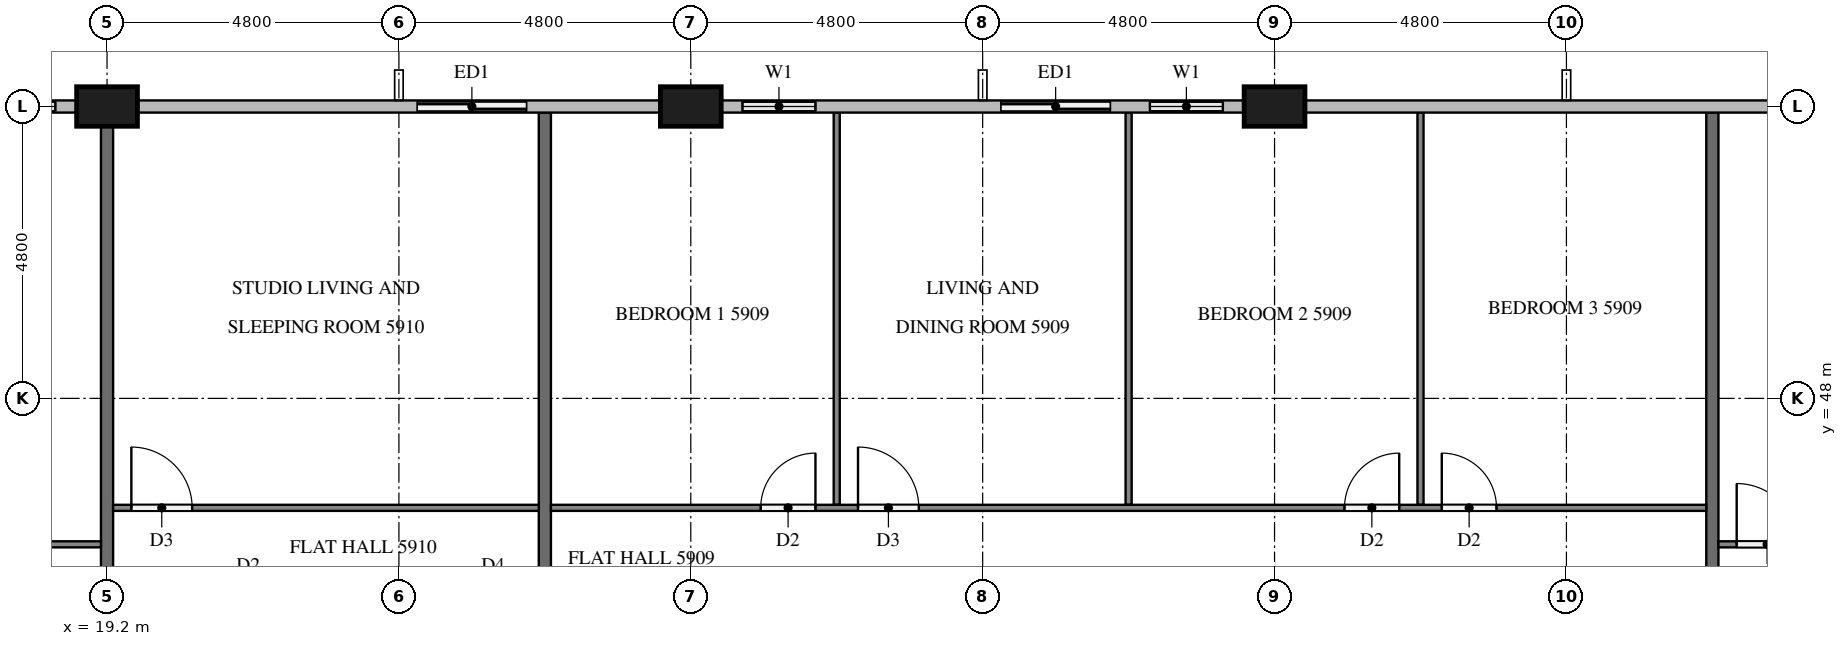
"""IFC4 building model, lengths in metres.
Left out: names, types, materials, properties, quantities, classifications, styles, units other than length and angle.
Written with IfcOpenShell. Run it as: python <this file> out.ifc"""

import sys

from ifc_helpers import new_model, si_unit, direction, frame, frame_2d, origin, origin_2d, place, context, subcontext, project, spatial, rectangle, extrude, element, fill, save


model = new_model("IFC4")
c1 = context("Model", 3, precision=1e-05, world=origin(), true_north=direction((0.0, 1.0)))
c2 = subcontext(c1, "Body", "Model", "MODEL_VIEW")
j1 = project(units=[si_unit("LENGTHUNIT", "METRE"), si_unit("PLANEANGLEUNIT", "RADIAN")], contexts=[c1])
p1 = place(None, origin())
s1 = spatial("IfcSite", under=j1, at=p1, CompositionType="ELEMENT")
p2 = place(p1, origin())
s2 = spatial("IfcBuilding", under=s1, at=p2, CompositionType="ELEMENT")
p3 = place(p2, frame((0.0, 0.0, 226.3)))
s3 = spatial("IfcBuildingStorey", under=s2, at=p3, CompositionType="ELEMENT", Elevation=226.3)
for number, where, z_axis, x_axis in (
    (1, (38.4, 52.8, 0.0), (0.0, 0.0, 1.0), (1.0, 0.0, 0.0)),
    (2, (28.8, 52.8, 0.0), (0.0, 0.0, 1.0), (1.0, 0.0, 0.0)),
    (3, (19.2, 52.8, 0.0), (0.0, 0.0, 1.0), (1.0, 0.0, 0.0)),
):
    element("IfcColumn", number, at=place(p3, frame(where, z_axis=z_axis, x_axis=x_axis)), inside=s3, PredefinedType="COLUMN", context=c2, shape_type="SweptSolid", body=[
        extrude(rectangle(XDim=1.0, YDim=0.65, at=origin_2d()), origin(), (0.0, 0.0, 1.0), 3.2),
    ])
p4 = place(p3, frame((37.9, 52.8, 0.0), z_axis=(0.0, 0.0, 1.0), x_axis=(-1.0, 0.0, 0.0)))
e4 = element("IfcWall", 4, at=p4, inside=s3, PredefinedType="SOLIDWALL", context=c2, shape_type="SweptSolid", body=[
    extrude(rectangle(XDim=4.3, YDim=0.15, at=frame_2d((2.15, 0.0))), origin(), (0.0, 0.0, 1.0), 3.2),
])
p5 = place(p4, frame((0.35, 0.0, 0.9)))
e5 = element("IfcOpeningElement", 5, at=p5, cuts=e4, PredefinedType="OPENING", context=c2, shape_type="SweptSolid", body=[
    extrude(rectangle(XDim=1.2, YDim=1.4, at=frame_2d((0.6, 0.7))), frame((0.0, 0.085, 0.0), z_axis=(0.0, -1.0, 0.0), x_axis=(1.0, 0.0, 0.0)), (0.0, 0.0, 1.0), 0.17),
])
p6 = place(p4, frame((2.2, 0.0, 0.0)))
e6 = element("IfcOpeningElement", 6, at=p6, cuts=e4, PredefinedType="OPENING", context=c2, shape_type="SweptSolid", body=[
    extrude(rectangle(XDim=1.8, YDim=2.4, at=frame_2d((0.9, 1.2))), frame((0.0, 0.085, 0.0), z_axis=(0.0, -1.0, 0.0), x_axis=(1.0, 0.0, 0.0)), (0.0, 0.0, 1.0), 0.17),
])
p7 = place(p3, frame((31.2, 52.8, 0.0), z_axis=(0.0, 0.0, 1.0), x_axis=(-1.0, 0.0, 0.0)))
e7 = element("IfcWall", 7, at=p7, inside=s3, PredefinedType="SOLIDWALL", context=c2, shape_type="SweptSolid", body=[
    extrude(rectangle(XDim=1.9, YDim=0.15, at=frame_2d((0.95, 0.0))), origin(), (0.0, 0.0, 1.0), 3.2),
])
p8 = place(p7, frame((0.35, 0.0, 0.9)))
e8 = element("IfcOpeningElement", 8, at=p8, cuts=e7, PredefinedType="OPENING", context=c2, shape_type="SweptSolid", body=[
    extrude(rectangle(XDim=1.2, YDim=1.4, at=frame_2d((0.6, 0.7))), frame((0.0, 0.085, 0.0), z_axis=(0.0, -1.0, 0.0), x_axis=(1.0, 0.0, 0.0)), (0.0, 0.0, 1.0), 0.17),
])
p9 = place(p3, frame((26.4, 52.8, 0.0), z_axis=(0.0, 0.0, 1.0), x_axis=(-1.0, 0.0, 0.0)))
e9 = element("IfcWall", 9, at=p9, inside=s3, PredefinedType="SOLIDWALL", context=c2, shape_type="SweptSolid", body=[
    extrude(rectangle(XDim=2.4, YDim=0.15, at=frame_2d((1.2, 0.0))), origin(), (0.0, 0.0, 1.0), 3.2),
])
p10 = place(p9, frame((0.3, 0.0, 0.0)))
e10 = element("IfcOpeningElement", 10, at=p10, cuts=e9, PredefinedType="OPENING", context=c2, shape_type="SweptSolid", body=[
    extrude(rectangle(XDim=1.8, YDim=2.4, at=frame_2d((0.9, 1.2))), frame((0.0, 0.085, 0.0), z_axis=(0.0, -1.0, 0.0), x_axis=(1.0, 0.0, 0.0)), (0.0, 0.0, 1.0), 0.17),
])
p11 = place(p3, frame((18.7, 52.8, 0.0), z_axis=(0.0, 0.0, 1.0), x_axis=(-1.0, 0.0, 0.0)))
e11 = element("IfcWall", 11, at=p11, inside=s3, PredefinedType="SOLIDWALL", context=c2, shape_type="SweptSolid", body=[
    extrude(rectangle(XDim=1.9, YDim=0.15, at=frame_2d((0.95, 0.0))), origin(), (0.0, 0.0, 1.0), 3.2),
])
p12 = place(p11, frame((0.35, 0.0, 0.9)))
e12 = element("IfcOpeningElement", 12, at=p12, cuts=e11, PredefinedType="OPENING", context=c2, shape_type="SweptSolid", body=[
    extrude(rectangle(XDim=1.2, YDim=1.4, at=frame_2d((0.6, 0.7))), frame((0.0, 0.085, 0.0), z_axis=(0.0, -1.0, 0.0), x_axis=(1.0, 0.0, 0.0)), (0.0, 0.0, 1.0), 0.17),
])
for number, where, z_axis, x_axis in (
    (13, (45.6, 52.7, 0.0), (0.0, 0.0, 1.0), (0.0, -1.0, 0.0)),
    (14, (26.4, 52.7, 0.0), (0.0, 0.0, 1.0), (0.0, -1.0, 0.0)),
):
    element("IfcWall", number, at=place(p3, frame(where, z_axis=z_axis, x_axis=x_axis)), inside=s3, PredefinedType="PARTITIONING", context=c2, shape_type="SweptSolid", body=[
        extrude(rectangle(XDim=11.8, YDim=0.2, at=frame_2d((5.9, 0.0))), origin(), (0.0, 0.0, 1.0), 3.2),
    ])
p13 = place(p3, frame((19.2, 52.475, 0.0), z_axis=(0.0, 0.0, 1.0), x_axis=(0.0, -1.0, 0.0)))
e15 = element("IfcWall", 15, at=p13, inside=s3, PredefinedType="PARTITIONING", context=c2, shape_type="SweptSolid", body=[
    extrude(rectangle(XDim=11.575, YDim=0.2, at=frame_2d((5.788, 0.0))), origin(), (0.0, 0.0, 1.0), 3.2),
])
p14 = place(p3, frame((45.7, 45.6, 0.0), z_axis=(0.0, 0.0, 1.0), x_axis=(1.0, 0.0, 0.0)))
e16 = element("IfcWall", 16, at=p14, inside=s3, PredefinedType="PARTITIONING", context=c2, shape_type="SweptSolid", body=[
    extrude(rectangle(XDim=16.6, YDim=0.1, at=frame_2d((8.3, 0.0))), origin(), (0.0, 0.0, 1.0), 3.2),
])
p15 = place(p14, frame((0.3, 0.0, 0.0)))
e17 = element("IfcOpeningElement", 17, at=p15, cuts=e16, PredefinedType="OPENING", context=c2, shape_type="SweptSolid", body=[
    extrude(rectangle(XDim=1.0, YDim=2.1, at=frame_2d((0.5, 1.05))), frame((0.0, 0.06, 0.0), z_axis=(0.0, -1.0, 0.0), x_axis=(1.0, 0.0, 0.0)), (0.0, 0.0, 1.0), 0.12),
])
p16 = place(p14, frame((10.65, 0.0, 0.0)))
e18 = element("IfcOpeningElement", 18, at=p16, cuts=e16, PredefinedType="OPENING", context=c2, shape_type="SweptSolid", body=[
    extrude(rectangle(XDim=0.9, YDim=2.1, at=frame_2d((0.45, 1.05))), frame((0.0, 0.06, 0.0), z_axis=(0.0, -1.0, 0.0), x_axis=(1.0, 0.0, 0.0)), (0.0, 0.0, 1.0), 0.12),
])
p17 = place(p14, frame((12.25, 0.0, 0.0)))
e19 = element("IfcOpeningElement", 19, at=p17, cuts=e16, PredefinedType="OPENING", context=c2, shape_type="SweptSolid", body=[
    extrude(rectangle(XDim=0.9, YDim=2.1, at=frame_2d((0.45, 1.05))), frame((0.0, 0.06, 0.0), z_axis=(0.0, -1.0, 0.0), x_axis=(1.0, 0.0, 0.0)), (0.0, 0.0, 1.0), 0.12),
])
for number, where, z_axis, x_axis in (
    (20, (31.2, 46.25, 0.0), (0.0, 0.0, 1.0), (0.0, 1.0, 0.0)),
    (21, (36.0, 46.25, 0.0), (0.0, 0.0, 1.0), (0.0, 1.0, 0.0)),
    (22, (40.8, 46.25, 0.0), (0.0, 0.0, 1.0), (0.0, 1.0, 0.0)),
):
    element("IfcWall", number, at=place(p3, frame(where, z_axis=z_axis, x_axis=x_axis)), inside=s3, PredefinedType="PARTITIONING", context=c2, shape_type="SweptSolid", body=[
        extrude(rectangle(XDim=6.45, YDim=0.1, at=frame_2d((3.225, 0.0))), origin(), (0.0, 0.0, 1.0), 3.2),
    ])
p18 = place(p3, frame((26.5, 46.2, 0.0), z_axis=(0.0, 0.0, 1.0), x_axis=(1.0, 0.0, 0.0)))
e23 = element("IfcWall", 23, at=p18, inside=s3, PredefinedType="PARTITIONING", context=c2, shape_type="SweptSolid", body=[
    extrude(rectangle(XDim=19.0, YDim=0.1, at=frame_2d((9.5, 0.0))), origin(), (0.0, 0.0, 1.0), 3.2),
])
p19 = place(p18, frame((3.45, 0.0, 0.0)))
e24 = element("IfcOpeningElement", 24, at=p19, cuts=e23, PredefinedType="OPENING", context=c2, shape_type="SweptSolid", body=[
    extrude(rectangle(XDim=0.9, YDim=2.1, at=frame_2d((0.45, 1.05))), frame((0.0, 0.06, 0.0), z_axis=(0.0, -1.0, 0.0), x_axis=(1.0, 0.0, 0.0)), (0.0, 0.0, 1.0), 0.12),
])
p20 = place(p18, frame((5.05, 0.0, 0.0)))
e25 = element("IfcOpeningElement", 25, at=p20, cuts=e23, PredefinedType="OPENING", context=c2, shape_type="SweptSolid", body=[
    extrude(rectangle(XDim=1.0, YDim=2.1, at=frame_2d((0.5, 1.05))), frame((0.0, 0.06, 0.0), z_axis=(0.0, -1.0, 0.0), x_axis=(1.0, 0.0, 0.0)), (0.0, 0.0, 1.0), 0.12),
])
p21 = place(p18, frame((13.05, 0.0, 0.0)))
e26 = element("IfcOpeningElement", 26, at=p21, cuts=e23, PredefinedType="OPENING", context=c2, shape_type="SweptSolid", body=[
    extrude(rectangle(XDim=0.9, YDim=2.1, at=frame_2d((0.45, 1.05))), frame((0.0, 0.06, 0.0), z_axis=(0.0, -1.0, 0.0), x_axis=(1.0, 0.0, 0.0)), (0.0, 0.0, 1.0), 0.12),
])
p22 = place(p18, frame((14.65, 0.0, 0.0)))
e27 = element("IfcOpeningElement", 27, at=p22, cuts=e23, PredefinedType="OPENING", context=c2, shape_type="SweptSolid", body=[
    extrude(rectangle(XDim=0.9, YDim=2.1, at=frame_2d((0.45, 1.05))), frame((0.0, 0.06, 0.0), z_axis=(0.0, -1.0, 0.0), x_axis=(1.0, 0.0, 0.0)), (0.0, 0.0, 1.0), 0.12),
])
p23 = place(p3, frame((19.3, 46.2, 0.0), z_axis=(0.0, 0.0, 1.0), x_axis=(1.0, 0.0, 0.0)))
e28 = element("IfcWall", 28, at=p23, inside=s3, PredefinedType="PARTITIONING", context=c2, shape_type="SweptSolid", body=[
    extrude(rectangle(XDim=7.0, YDim=0.1, at=frame_2d((3.5, 0.0))), origin(), (0.0, 0.0, 1.0), 3.2),
])
p24 = place(p23, frame((0.3, 0.0, 0.0)))
e29 = element("IfcOpeningElement", 29, at=p24, cuts=e28, PredefinedType="OPENING", context=c2, shape_type="SweptSolid", body=[
    extrude(rectangle(XDim=1.0, YDim=2.1, at=frame_2d((0.5, 1.05))), frame((0.0, 0.06, 0.0), z_axis=(0.0, -1.0, 0.0), x_axis=(1.0, 0.0, 0.0)), (0.0, 0.0, 1.0), 0.12),
])
p25 = place(p3, frame((4.9, 45.6, 0.0), z_axis=(0.0, 0.0, 1.0), x_axis=(1.0, 0.0, 0.0)))
e30 = element("IfcWall", 30, at=p25, inside=s3, PredefinedType="PARTITIONING", context=c2, shape_type="SweptSolid", body=[
    extrude(rectangle(XDim=14.2, YDim=0.1, at=frame_2d((7.1, 0.0))), origin(), (0.0, 0.0, 1.0), 3.2),
])
p26 = place(p25, frame((9.85, 0.0, 0.0)))
e31 = element("IfcOpeningElement", 31, at=p26, cuts=e30, PredefinedType="OPENING", context=c2, shape_type="SweptSolid", body=[
    extrude(rectangle(XDim=0.9, YDim=2.1, at=frame_2d((0.45, 1.05))), frame((0.0, 0.06, 0.0), z_axis=(0.0, -1.0, 0.0), x_axis=(1.0, 0.0, 0.0)), (0.0, 0.0, 1.0), 0.12),
])
p27 = place(p25, frame((8.25, 0.0, 0.0)))
e32 = element("IfcOpeningElement", 32, at=p27, cuts=e30, PredefinedType="OPENING", context=c2, shape_type="SweptSolid", body=[
    extrude(rectangle(XDim=0.9, YDim=2.1, at=frame_2d((0.45, 1.05))), frame((0.0, 0.06, 0.0), z_axis=(0.0, -1.0, 0.0), x_axis=(1.0, 0.0, 0.0)), (0.0, 0.0, 1.0), 0.12),
])
p28 = place(p25, frame((0.3, 0.0, 0.0)))
e33 = element("IfcOpeningElement", 33, at=p28, cuts=e30, PredefinedType="OPENING", context=c2, shape_type="SweptSolid", body=[
    extrude(rectangle(XDim=1.0, YDim=2.1, at=frame_2d((0.5, 1.05))), frame((0.0, 0.06, 0.0), z_axis=(0.0, -1.0, 0.0), x_axis=(1.0, 0.0, 0.0)), (0.0, 0.0, 1.0), 0.12),
])
p29 = place(p5, origin())
e34 = element("IfcWindow", 34, at=p29, inside=s3, PartitioningType="SINGLE_PANEL", PredefinedType="WINDOW", context=c2, shape_type="SweptSolid", body=[
    extrude(rectangle(XDim=1.2, YDim=1.4, at=frame_2d((0.6, 0.7))), frame((0.0, 0.03, 0.0), z_axis=(0.0, -1.0, 0.0), x_axis=(1.0, 0.0, 0.0)), (0.0, 0.0, 1.0), 0.06),
])
fill(e5, e34)
p30 = place(p6, origin())
e35 = element("IfcDoor", 35, at=p30, inside=s3, OperationType="SLIDING_TO_LEFT", PredefinedType="DOOR", context=c2, shape_type="SweptSolid", body=[
    extrude(rectangle(XDim=1.8, YDim=2.4, at=frame_2d((0.9, 1.2))), frame((0.0, 0.025, 0.0), z_axis=(0.0, -1.0, 0.0), x_axis=(1.0, 0.0, 0.0)), (0.0, 0.0, 1.0), 0.05),
])
fill(e6, e35)
p31 = place(p8, origin())
e36 = element("IfcWindow", 36, at=p31, inside=s3, PartitioningType="SINGLE_PANEL", PredefinedType="WINDOW", context=c2, shape_type="SweptSolid", body=[
    extrude(rectangle(XDim=1.2, YDim=1.4, at=frame_2d((0.6, 0.7))), frame((0.0, 0.03, 0.0), z_axis=(0.0, -1.0, 0.0), x_axis=(1.0, 0.0, 0.0)), (0.0, 0.0, 1.0), 0.06),
])
fill(e8, e36)
p32 = place(p10, origin())
e37 = element("IfcDoor", 37, at=p32, inside=s3, OperationType="SLIDING_TO_RIGHT", PredefinedType="DOOR", context=c2, shape_type="SweptSolid", body=[
    extrude(rectangle(XDim=1.8, YDim=2.4, at=frame_2d((0.9, 1.2))), frame((0.0, 0.025, 0.0), z_axis=(0.0, -1.0, 0.0), x_axis=(1.0, 0.0, 0.0)), (0.0, 0.0, 1.0), 0.05),
])
fill(e10, e37)
p33 = place(p12, origin())
e38 = element("IfcWindow", 38, at=p33, inside=s3, PartitioningType="SINGLE_PANEL", PredefinedType="WINDOW", context=c2, shape_type="SweptSolid", body=[
    extrude(rectangle(XDim=1.2, YDim=1.4, at=frame_2d((0.6, 0.7))), frame((0.0, 0.03, 0.0), z_axis=(0.0, -1.0, 0.0), x_axis=(1.0, 0.0, 0.0)), (0.0, 0.0, 1.0), 0.06),
])
fill(e12, e38)
p34 = place(p15, origin())
e39 = element("IfcDoor", 39, at=p34, inside=s3, OperationType="SINGLE_SWING_LEFT", PredefinedType="DOOR", context=c2, shape_type="SweptSolid", body=[
    extrude(rectangle(XDim=1.0, YDim=2.1, at=frame_2d((0.5, 1.05))), frame((0.0, 0.025, 0.0), z_axis=(0.0, -1.0, 0.0), x_axis=(1.0, 0.0, 0.0)), (0.0, 0.0, 1.0), 0.05),
])
fill(e17, e39)
p35 = place(p19, origin())
e40 = element("IfcDoor", 40, at=p35, inside=s3, OperationType="SINGLE_SWING_RIGHT", PredefinedType="DOOR", context=c2, shape_type="SweptSolid", body=[
    extrude(rectangle(XDim=0.9, YDim=2.1, at=frame_2d((0.45, 1.05))), frame((0.0, 0.025, 0.0), z_axis=(0.0, -1.0, 0.0), x_axis=(1.0, 0.0, 0.0)), (0.0, 0.0, 1.0), 0.05),
])
fill(e24, e40)
p36 = place(p20, origin())
e41 = element("IfcDoor", 41, at=p36, inside=s3, OperationType="SINGLE_SWING_LEFT", PredefinedType="DOOR", context=c2, shape_type="SweptSolid", body=[
    extrude(rectangle(XDim=1.0, YDim=2.1, at=frame_2d((0.5, 1.05))), frame((0.0, 0.025, 0.0), z_axis=(0.0, -1.0, 0.0), x_axis=(1.0, 0.0, 0.0)), (0.0, 0.0, 1.0), 0.05),
])
fill(e25, e41)
p37 = place(p21, origin())
e42 = element("IfcDoor", 42, at=p37, inside=s3, OperationType="SINGLE_SWING_RIGHT", PredefinedType="DOOR", context=c2, shape_type="SweptSolid", body=[
    extrude(rectangle(XDim=0.9, YDim=2.1, at=frame_2d((0.45, 1.05))), frame((0.0, 0.025, 0.0), z_axis=(0.0, -1.0, 0.0), x_axis=(1.0, 0.0, 0.0)), (0.0, 0.0, 1.0), 0.05),
])
fill(e26, e42)
p38 = place(p22, origin())
e43 = element("IfcDoor", 43, at=p38, inside=s3, OperationType="SINGLE_SWING_LEFT", PredefinedType="DOOR", context=c2, shape_type="SweptSolid", body=[
    extrude(rectangle(XDim=0.9, YDim=2.1, at=frame_2d((0.45, 1.05))), frame((0.0, 0.025, 0.0), z_axis=(0.0, -1.0, 0.0), x_axis=(1.0, 0.0, 0.0)), (0.0, 0.0, 1.0), 0.05),
])
fill(e27, e43)
p39 = place(p24, origin())
e44 = element("IfcDoor", 44, at=p39, inside=s3, OperationType="SINGLE_SWING_LEFT", PredefinedType="DOOR", context=c2, shape_type="SweptSolid", body=[
    extrude(rectangle(XDim=1.0, YDim=2.1, at=frame_2d((0.5, 1.05))), frame((0.0, 0.025, 0.0), z_axis=(0.0, -1.0, 0.0), x_axis=(1.0, 0.0, 0.0)), (0.0, 0.0, 1.0), 0.05),
])
fill(e29, e44)
save(model, sys.argv[1])
